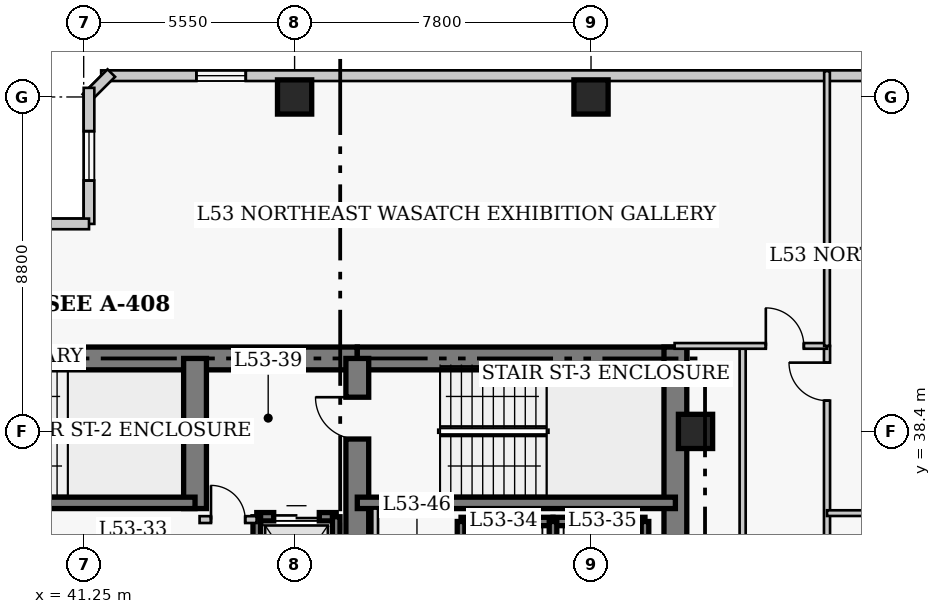
"""IFC4 building model, lengths in metres.
Left out: names, types, materials, properties, quantities, classifications, styles, units other than length and angle.
Written with IfcOpenShell. Run it as: python <this file> out.ifc"""

import sys

from ifc_helpers import new_model, si_unit, direction, frame, frame_2d, origin, origin_2d, place, context, subcontext, project, spatial, rectangle, extrude, element, fill, save


model = new_model("IFC4")
c1 = context("Model", 3, precision=1e-05, world=origin(), true_north=direction((0.0, 1.0)))
c2 = subcontext(c1, "Body", "Model", "MODEL_VIEW")
j1 = project(units=[si_unit("LENGTHUNIT", "METRE"), si_unit("PLANEANGLEUNIT", "RADIAN")], contexts=[c1])
p1 = place(None, origin())
s1 = spatial("IfcSite", under=j1, at=p1, CompositionType="ELEMENT")
p2 = place(p1, origin())
s2 = spatial("IfcBuilding", under=s1, at=p2, CompositionType="ELEMENT")
p3 = place(p2, frame((0.0, 0.0, 212.4)))
s3 = spatial("IfcBuildingStorey", under=s2, at=p3, CompositionType="ELEMENT", Elevation=212.4)
p4 = place(p3, frame((35.85, 40.32, 0.0), z_axis=(0.0, 0.0, 1.0), x_axis=(1.0, 0.0, 0.0)))
e1 = element("IfcWall", 1, at=p4, inside=s3, PredefinedType="SHEAR", context=c2, shape_type="SweptSolid", body=[
    extrude(rectangle(XDim=12.6, YDim=0.6, at=frame_2d((6.3, 0.0))), origin(), (0.0, 0.0, 1.0), 3.9),
])
p5 = place(p3, frame((48.45, 40.32, 0.0), z_axis=(0.0, 0.0, 1.0), x_axis=(1.0, 0.0, 0.0)))
e2 = element("IfcWall", 2, at=p5, inside=s3, PredefinedType="SHEAR", context=c2, shape_type="SweptSolid", body=[
    extrude(rectangle(XDim=8.67, YDim=0.6, at=frame_2d((4.335, 0.0))), origin(), (0.0, 0.0, 1.0), 3.9),
])
p6 = place(p3, frame((56.82, 27.05, 0.0), z_axis=(0.0, 0.0, 1.0), x_axis=(0.0, 1.0, 0.0)))
e3 = element("IfcWall", 3, at=p6, inside=s3, PredefinedType="SHEAR", context=c2, shape_type="SweptSolid", body=[
    extrude(rectangle(XDim=13.57, YDim=0.6, at=frame_2d((6.785, 0.0))), origin(), (0.0, 0.0, 1.0), 3.9),
])
p7 = place(p3, frame((44.18, 36.37, 0.0), z_axis=(0.0, 0.0, 1.0), x_axis=(0.0, 1.0, 0.0)))
e4 = element("IfcWall", 4, at=p7, inside=s3, PredefinedType="SHEAR", context=c2, shape_type="SweptSolid", body=[
    extrude(rectangle(XDim=3.95, YDim=0.6, at=frame_2d((1.975, 0.0))), origin(), (0.0, 0.0, 1.0), 3.9),
])
p8 = place(p3, frame((48.45, 32.45, 0.0), z_axis=(0.0, 0.0, 1.0), x_axis=(0.0, 1.0, 0.0)))
e5 = element("IfcWall", 5, at=p8, inside=s3, PredefinedType="SHEAR", context=c2, shape_type="SweptSolid", body=[
    extrude(rectangle(XDim=7.87, YDim=0.6, at=frame_2d((3.935, 0.0))), origin(), (0.0, 0.0, 1.0), 3.9),
])
p9 = place(p8, frame((5.75, 0.0, 0.0)))
e6 = element("IfcOpeningElement", 6, at=p9, cuts=e5, PredefinedType="OPENING", context=c2, shape_type="SweptSolid", body=[
    extrude(rectangle(XDim=1.1, YDim=2.15, at=frame_2d((0.55, 1.075))), frame((0.0, 0.31, 0.0), z_axis=(0.0, -1.0, 0.0), x_axis=(1.0, 0.0, 0.0)), (0.0, 0.0, 1.0), 0.62),
])
p10 = place(p3, frame((35.85, 36.52, 0.0), z_axis=(0.0, 0.0, 1.0), x_axis=(1.0, 0.0, 0.0)))
e7 = element("IfcWall", 7, at=p10, inside=s3, PredefinedType="SHEAR", context=c2, shape_type="SweptSolid", body=[
    extrude(rectangle(XDim=8.33, YDim=0.3, at=frame_2d((4.165, 0.0))), origin(), (0.0, 0.0, 1.0), 3.9),
])
p11 = place(p3, frame((48.45, 36.52, 0.0), z_axis=(0.0, 0.0, 1.0), x_axis=(1.0, 0.0, 0.0)))
e8 = element("IfcWall", 8, at=p11, inside=s3, PredefinedType="SHEAR", context=c2, shape_type="SweptSolid", body=[
    extrude(rectangle(XDim=8.37, YDim=0.3, at=frame_2d((4.185, 0.0))), origin(), (0.0, 0.0, 1.0), 3.9),
])
for number, where, z_axis, x_axis in (
    (9, (46.8, 47.2, 0.0), (0.0, 0.0, 1.0), (1.0, 0.0, 0.0)),
    (10, (54.6, 47.2, 0.0), (0.0, 0.0, 1.0), (1.0, 0.0, 0.0)),
    (11, (57.35, 38.4, 0.0), (0.0, 0.0, 1.0), (1.0, 0.0, 0.0)),
):
    element("IfcColumn", number, at=place(p3, frame(where, z_axis=z_axis, x_axis=x_axis)), inside=s3, PredefinedType="COLUMN", context=c2, shape_type="SweptSolid", body=[
        extrude(rectangle(XDim=0.9, YDim=0.9, at=origin_2d()), origin(), (0.0, 0.0, 1.0), 3.9),
    ])
p12 = place(p3, frame((67.54, 47.76, 0.0), z_axis=(0.0, 0.0, 1.0), x_axis=(-1.0, 0.0, 0.0)))
e12 = element("IfcWall", 12, at=p12, inside=s3, PredefinedType="SOLIDWALL", context=c2, shape_type="SweptSolid", body=[
    extrude(rectangle(XDim=25.83, YDim=0.28, at=frame_2d((12.915, 0.0))), origin(), (0.0, 0.0, 1.0), 3.65),
])
p13 = place(p12, frame((3.655, 0.0, 0.85)))
e13 = element("IfcOpeningElement", 13, at=p13, cuts=e12, PredefinedType="OPENING", context=c2, shape_type="SweptSolid", body=[
    extrude(rectangle(XDim=1.3, YDim=1.7, at=frame_2d((0.65, 0.85))), frame((0.0, 0.15, 0.0), z_axis=(0.0, -1.0, 0.0), x_axis=(1.0, 0.0, 0.0)), (0.0, 0.0, 1.0), 0.3),
])
p14 = place(p12, frame((22.025, 0.0, 0.85)))
e14 = element("IfcOpeningElement", 14, at=p14, cuts=e12, PredefinedType="OPENING", context=c2, shape_type="SweptSolid", body=[
    extrude(rectangle(XDim=1.3, YDim=1.7, at=frame_2d((0.65, 0.85))), frame((0.0, 0.15, 0.0), z_axis=(0.0, -1.0, 0.0), x_axis=(1.0, 0.0, 0.0)), (0.0, 0.0, 1.0), 0.3),
])
p15 = place(p3, frame((41.977, 47.829, 0.0), z_axis=(0.0, 0.0, 1.0), x_axis=(-0.706975312048, -0.707238225886, 0.0)))
e15 = element("IfcWall", 15, at=p15, inside=s3, PredefinedType="SOLIDWALL", context=c2, shape_type="SweptSolid", body=[
    extrude(rectangle(XDim=0.929, YDim=0.28, at=frame_2d((0.464, 0.0))), origin(), (0.0, 0.0, 1.0), 3.65),
])
p16 = place(p3, frame((41.39, 47.44, 0.0), z_axis=(0.0, 0.0, 1.0), x_axis=(0.0, -1.0, 0.0)))
e16 = element("IfcWall", 16, at=p16, inside=s3, PredefinedType="SOLIDWALL", context=c2, shape_type="SweptSolid", body=[
    extrude(rectangle(XDim=3.58, YDim=0.28, at=frame_2d((1.79, 0.0))), origin(), (0.0, 0.0, 1.0), 3.65),
])
p17 = place(p16, frame((1.14, 0.0, 0.85)))
e17 = element("IfcOpeningElement", 17, at=p17, cuts=e16, PredefinedType="OPENING", context=c2, shape_type="SweptSolid", body=[
    extrude(rectangle(XDim=1.3, YDim=1.7, at=frame_2d((0.65, 0.85))), frame((0.0, 0.15, 0.0), z_axis=(0.0, -1.0, 0.0), x_axis=(1.0, 0.0, 0.0)), (0.0, 0.0, 1.0), 0.3),
])
p18 = place(p3, frame((41.39, 43.86, 0.0), z_axis=(0.0, 0.0, 1.0), x_axis=(-1.0, 0.0, 0.0)))
e18 = element("IfcWall", 18, at=p18, inside=s3, PredefinedType="SOLIDWALL", context=c2, shape_type="SweptSolid", body=[
    extrude(rectangle(XDim=4.78, YDim=0.28, at=frame_2d((2.39, 0.0))), origin(), (0.0, 0.0, 1.0), 3.65),
])
p19 = place(p18, frame((1.74, 0.0, 0.85)))
e19 = element("IfcOpeningElement", 19, at=p19, cuts=e18, PredefinedType="OPENING", context=c2, shape_type="SweptSolid", body=[
    extrude(rectangle(XDim=1.3, YDim=1.7, at=frame_2d((0.65, 0.85))), frame((0.0, 0.15, 0.0), z_axis=(0.0, -1.0, 0.0), x_axis=(1.0, 0.0, 0.0)), (0.0, 0.0, 1.0), 0.3),
])
p20 = place(p3, frame((51.18, 36.03, 0.0), z_axis=(0.0, 0.0, 1.0), x_axis=(1.0, 0.0, 0.0)))
e20 = element("IfcWall", 20, at=p20, inside=s3, PredefinedType="SHEAR", context=c2, shape_type="SweptSolid", body=[
    extrude(rectangle(XDim=2.42, YDim=0.22, at=frame_2d((1.21, 0.0))), origin(), (0.0, 0.0, 1.0), 3.9),
])
p21 = place(p3, frame((51.18, 33.17, 0.0), z_axis=(0.0, 0.0, 1.0), x_axis=(0.0, 1.0, 0.0)))
e21 = element("IfcWall", 21, at=p21, inside=s3, PredefinedType="SHEAR", context=c2, shape_type="SweptSolid", body=[
    extrude(rectangle(XDim=2.86, YDim=0.2, at=frame_2d((1.43, 0.0))), origin(), (0.0, 0.0, 1.0), 3.9),
])
p22 = place(p3, frame((53.6, 36.03, 0.0), z_axis=(0.0, 0.0, 1.0), x_axis=(1.0, 0.0, 0.0)))
e22 = element("IfcWall", 22, at=p22, inside=s3, PredefinedType="SHEAR", context=c2, shape_type="SweptSolid", body=[
    extrude(rectangle(XDim=2.42, YDim=0.22, at=frame_2d((1.21, 0.0))), origin(), (0.0, 0.0, 1.0), 3.9),
])
for number, where, z_axis, x_axis in (
    (23, (53.6, 33.17, 0.0), (0.0, 0.0, 1.0), (0.0, 1.0, 0.0)),
    (24, (56.02, 33.17, 0.0), (0.0, 0.0, 1.0), (0.0, 1.0, 0.0)),
):
    element("IfcWall", number, at=place(p3, frame(where, z_axis=z_axis, x_axis=x_axis)), inside=s3, PredefinedType="SHEAR", context=c2, shape_type="SweptSolid", body=[
        extrude(rectangle(XDim=2.86, YDim=0.2, at=frame_2d((1.43, 0.0))), origin(), (0.0, 0.0, 1.0), 3.9),
    ])
p23 = place(p3, frame((45.805, 36.155, 0.0), z_axis=(0.0, 0.0, 1.0), x_axis=(1.0, 0.0, 0.0)))
e25 = element("IfcWall", 25, at=p23, inside=s3, PredefinedType="SHEAR", context=c2, shape_type="SweptSolid", body=[
    extrude(rectangle(XDim=2.09, YDim=0.22, at=frame_2d((1.045, 0.0))), origin(), (0.0, 0.0, 1.0), 3.9),
])
p24 = place(p23, frame((0.445, 0.0, 0.0)))
e26 = element("IfcOpeningElement", 26, at=p24, cuts=e25, PredefinedType="OPENING", context=c2, shape_type="SweptSolid", body=[
    extrude(rectangle(XDim=1.2, YDim=2.15, at=frame_2d((0.6, 1.075))), frame((0.0, 0.12, 0.0), z_axis=(0.0, -1.0, 0.0), x_axis=(1.0, 0.0, 0.0)), (0.0, 0.0, 1.0), 0.24),
])
p25 = place(p3, frame((45.805, 32.65, 0.0), z_axis=(0.0, 0.0, 1.0), x_axis=(0.0, 1.0, 0.0)))
e27 = element("IfcWall", 27, at=p25, inside=s3, PredefinedType="SHEAR", context=c2, shape_type="SweptSolid", body=[
    extrude(rectangle(XDim=3.505, YDim=0.2, at=frame_2d((1.752, 0.0))), origin(), (0.0, 0.0, 1.0), 3.9),
])
p26 = place(p3, frame((47.895, 33.245, 0.0), z_axis=(0.0, 0.0, 1.0), x_axis=(0.0, 1.0, 0.0)))
e28 = element("IfcWall", 28, at=p26, inside=s3, PredefinedType="SHEAR", context=c2, shape_type="SweptSolid", body=[
    extrude(rectangle(XDim=2.91, YDim=0.2, at=frame_2d((1.455, 0.0))), origin(), (0.0, 0.0, 1.0), 3.9),
])
p27 = place(p3, frame((44.3, 36.08, 0.0), z_axis=(0.0, 0.0, 1.0), x_axis=(1.0, 0.0, 0.0)))
e29 = element("IfcWall", 29, at=p27, inside=s3, PredefinedType="PARTITIONING", context=c2, shape_type="SweptSolid", body=[
    extrude(rectangle(XDim=1.5, YDim=0.18, at=frame_2d((0.75, 0.0))), origin(), (0.0, 0.0, 1.0), 3.65),
])
p28 = place(p27, frame((0.3, 0.0, 0.0)))
e30 = element("IfcOpeningElement", 30, at=p28, cuts=e29, PredefinedType="OPENING", context=c2, shape_type="SweptSolid", body=[
    extrude(rectangle(XDim=0.9, YDim=2.15, at=frame_2d((0.45, 1.075))), frame((0.0, 0.1, 0.0), z_axis=(0.0, -1.0, 0.0), x_axis=(1.0, 0.0, 0.0)), (0.0, 0.0, 1.0), 0.2),
])
p29 = place(p3, frame((48.92, 32.75, 0.0), z_axis=(0.0, 0.0, 1.0), x_axis=(0.0, 1.0, 0.0)))
e31 = element("IfcWall", 31, at=p29, inside=s3, PredefinedType="PARTITIONING", context=c2, shape_type="SweptSolid", body=[
    extrude(rectangle(XDim=3.62, YDim=0.15, at=frame_2d((1.81, 0.0))), origin(), (0.0, 0.0, 1.0), 3.65),
])
p30 = place(p3, frame((60.81, 11.95, 0.0), z_axis=(0.0, 0.0, 1.0), x_axis=(0.0, 1.0, 0.0)))
e32 = element("IfcWall", 32, at=p30, inside=s3, PredefinedType="PARTITIONING", context=c2, shape_type="SweptSolid", body=[
    extrude(rectangle(XDim=28.7, YDim=0.16, at=frame_2d((14.35, 0.0))), origin(), (0.0, 0.0, 1.0), 3.65),
])
p31 = place(p30, frame((3.55, 0.0, 0.0)))
e33 = element("IfcOpeningElement", 33, at=p31, cuts=e32, PredefinedType="OPENING", context=c2, shape_type="SweptSolid", body=[
    extrude(rectangle(XDim=0.95, YDim=2.1, at=frame_2d((0.475, 1.05))), frame((0.0, 0.09, 0.0), z_axis=(0.0, -1.0, 0.0), x_axis=(1.0, 0.0, 0.0)), (0.0, 0.0, 1.0), 0.18),
])
p32 = place(p30, frame((9.409, 0.0, 0.0)))
e34 = element("IfcOpeningElement", 34, at=p32, cuts=e32, PredefinedType="OPENING", context=c2, shape_type="SweptSolid", body=[
    extrude(rectangle(XDim=0.95, YDim=2.1, at=frame_2d((0.475, 1.05))), frame((0.0, 0.09, 0.0), z_axis=(0.0, -1.0, 0.0), x_axis=(1.0, 0.0, 0.0)), (0.0, 0.0, 1.0), 0.18),
])
p33 = place(p30, frame((27.26, 0.0, 0.0)))
e35 = element("IfcOpeningElement", 35, at=p33, cuts=e32, PredefinedType="OPENING", context=c2, shape_type="SweptSolid", body=[
    extrude(rectangle(XDim=1.0, YDim=2.15, at=frame_2d((0.5, 1.075))), frame((0.0, 0.09, 0.0), z_axis=(0.0, -1.0, 0.0), x_axis=(1.0, 0.0, 0.0)), (0.0, 0.0, 1.0), 0.18),
])
p34 = place(p3, frame((58.59, 16.86, 0.0), z_axis=(0.0, 0.0, 1.0), x_axis=(0.0, 1.0, 0.0)))
e36 = element("IfcWall", 36, at=p34, inside=s3, PredefinedType="PARTITIONING", context=c2, shape_type="SweptSolid", body=[
    extrude(rectangle(XDim=23.79, YDim=0.16, at=frame_2d((11.895, 0.0))), origin(), (0.0, 0.0, 1.0), 3.246),
])
p35 = place(p3, frame((56.8, 40.65, 0.0), z_axis=(0.0, 0.0, 1.0), x_axis=(1.0, 0.0, 0.0)))
e37 = element("IfcWall", 37, at=p35, inside=s3, PredefinedType="PARTITIONING", context=c2, shape_type="SweptSolid", body=[
    extrude(rectangle(XDim=4.01, YDim=0.15, at=frame_2d((2.005, 0.0))), origin(), (0.0, 0.0, 1.0), 3.65),
])
p36 = place(p35, frame((2.4, 0.0, 0.0)))
e38 = element("IfcOpeningElement", 38, at=p36, cuts=e37, PredefinedType="OPENING", context=c2, shape_type="SweptSolid", body=[
    extrude(rectangle(XDim=1.0, YDim=2.15, at=frame_2d((0.5, 1.075))), frame((0.0, 0.085, 0.0), z_axis=(0.0, -1.0, 0.0), x_axis=(1.0, 0.0, 0.0)), (0.0, 0.0, 1.0), 0.17),
])
p37 = place(p3, frame((60.81, 40.65, 0.0), z_axis=(0.0, 0.0, 1.0), x_axis=(0.0, 1.0, 0.0)))
e39 = element("IfcWall", 39, at=p37, inside=s3, PredefinedType="PARTITIONING", context=c2, shape_type="SweptSolid", body=[
    extrude(rectangle(XDim=7.23, YDim=0.15, at=frame_2d((3.615, 0.0))), origin(), (0.0, 0.0, 1.0), 3.65),
])
p38 = place(p3, frame((60.81, 36.25, 0.0), z_axis=(0.0, 0.0, 1.0), x_axis=(1.0, 0.0, 0.0)))
e40 = element("IfcWall", 40, at=p38, inside=s3, PredefinedType="PARTITIONING", context=c2, shape_type="SweptSolid", body=[
    extrude(rectangle(XDim=4.29, YDim=0.15, at=frame_2d((2.145, 0.0))), origin(), (0.0, 0.0, 1.0), 3.65),
])
p39 = place(p14, origin())
e41 = element("IfcWindow", 41, at=p39, inside=s3, PartitioningType="SINGLE_PANEL", PredefinedType="WINDOW", context=c2, shape_type="SweptSolid", body=[
    extrude(rectangle(XDim=1.3, YDim=1.7, at=frame_2d((0.65, 0.85))), frame((0.0, 0.03, 0.0), z_axis=(0.0, -1.0, 0.0), x_axis=(1.0, 0.0, 0.0)), (0.0, 0.0, 1.0), 0.06),
])
fill(e14, e41)
p40 = place(p17, origin())
e42 = element("IfcWindow", 42, at=p40, inside=s3, PartitioningType="SINGLE_PANEL", PredefinedType="WINDOW", context=c2, shape_type="SweptSolid", body=[
    extrude(rectangle(XDim=1.3, YDim=1.7, at=frame_2d((0.65, 0.85))), frame((0.0, 0.03, 0.0), z_axis=(0.0, -1.0, 0.0), x_axis=(1.0, 0.0, 0.0)), (0.0, 0.0, 1.0), 0.06),
])
fill(e17, e42)
p41 = place(p24, origin())
e43 = element("IfcDoor", 43, at=p41, inside=s3, OperationType="DOUBLE_DOOR_SLIDING", PredefinedType="DOOR", context=c2, shape_type="SweptSolid", body=[
    extrude(rectangle(XDim=1.2, YDim=2.15, at=frame_2d((0.6, 1.075))), frame((0.0, 0.025, 0.0), z_axis=(0.0, -1.0, 0.0), x_axis=(1.0, 0.0, 0.0)), (0.0, 0.0, 1.0), 0.05),
])
fill(e26, e43)
p42 = place(p28, origin())
e44 = element("IfcDoor", 44, at=p42, inside=s3, OperationType="SINGLE_SWING_LEFT", PredefinedType="DOOR", context=c2, shape_type="SweptSolid", body=[
    extrude(rectangle(XDim=0.9, YDim=2.15, at=frame_2d((0.45, 1.075))), frame((0.0, 0.025, 0.0), z_axis=(0.0, -1.0, 0.0), x_axis=(1.0, 0.0, 0.0)), (0.0, 0.0, 1.0), 0.05),
])
fill(e30, e44)
p43 = place(p36, origin())
e45 = element("IfcDoor", 45, at=p43, inside=s3, OperationType="SINGLE_SWING_LEFT", PredefinedType="DOOR", context=c2, shape_type="SweptSolid", body=[
    extrude(rectangle(XDim=1.0, YDim=2.15, at=frame_2d((0.5, 1.075))), frame((0.0, 0.025, 0.0), z_axis=(0.0, -1.0, 0.0), x_axis=(1.0, 0.0, 0.0)), (0.0, 0.0, 1.0), 0.05),
])
fill(e38, e45)
p44 = place(p33, origin())
e46 = element("IfcDoor", 46, at=p44, inside=s3, OperationType="SINGLE_SWING_RIGHT", PredefinedType="DOOR", context=c2, shape_type="SweptSolid", body=[
    extrude(rectangle(XDim=1.0, YDim=2.15, at=frame_2d((0.5, 1.075))), frame((0.0, 0.025, 0.0), z_axis=(0.0, -1.0, 0.0), x_axis=(1.0, 0.0, 0.0)), (0.0, 0.0, 1.0), 0.05),
])
fill(e35, e46)
p45 = place(p9, origin())
e47 = element("IfcDoor", 47, at=p45, inside=s3, OperationType="SINGLE_SWING_RIGHT", PredefinedType="DOOR", context=c2, shape_type="SweptSolid", body=[
    extrude(rectangle(XDim=1.1, YDim=2.15, at=frame_2d((0.55, 1.075))), frame((0.0, 0.025, 0.0), z_axis=(0.0, -1.0, 0.0), x_axis=(1.0, 0.0, 0.0)), (0.0, 0.0, 1.0), 0.05),
])
fill(e6, e47)
save(model, sys.argv[1])
